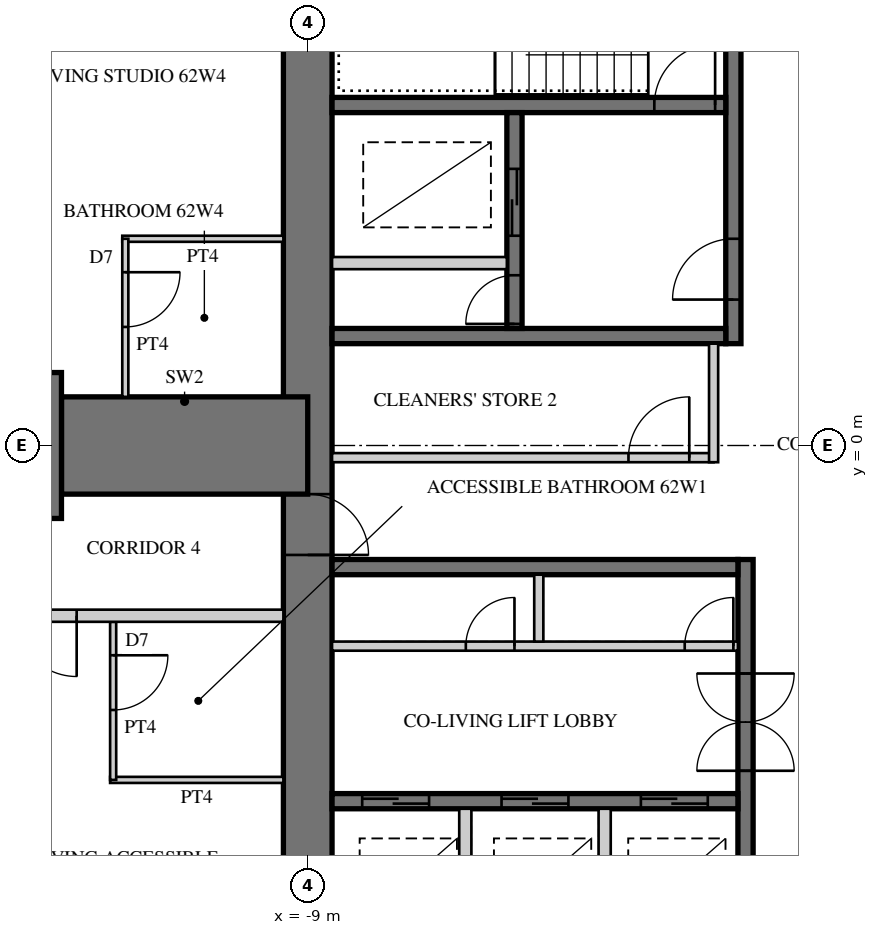
"""IFC4 building model, lengths in metres.
Left out: names, types, materials, properties, quantities, classifications, styles, units other than length and angle.
Written with IfcOpenShell. Run it as: python <this file> out.ifc"""

import sys

from ifc_helpers import new_model, si_unit, direction, frame, frame_2d, origin, place, context, subcontext, project, spatial, rectangle, extrude, element, fill, save


model = new_model("IFC4")
c1 = context("Model", 3, precision=1e-05, world=origin(), true_north=direction((0.0, 1.0)))
c2 = subcontext(c1, "Body", "Model", "MODEL_VIEW")
j1 = project(units=[si_unit("LENGTHUNIT", "METRE"), si_unit("PLANEANGLEUNIT", "RADIAN")], contexts=[c1])
p1 = place(None, origin())
s1 = spatial("IfcSite", under=j1, at=p1, CompositionType="ELEMENT")
p2 = place(p1, origin())
s2 = spatial("IfcBuilding", under=s1, at=p2, CompositionType="ELEMENT")
p3 = place(p2, frame((0.0, 0.0, 242.5)))
s3 = spatial("IfcBuildingStorey", under=s2, at=p3, CompositionType="ELEMENT", Elevation=242.5)
p4 = place(p3, frame((-9.0, 9.0, 0.0), z_axis=(0.0, 0.0, 1.0), x_axis=(0.0, -1.0, 0.0)))
e1 = element("IfcWall", 1, at=p4, inside=s3, PredefinedType="SHEAR", context=c2, shape_type="SweptSolid", body=[
    extrude(rectangle(XDim=18.0, YDim=0.8, at=frame_2d((9.0, 0.0))), origin(), (0.0, 0.0, 1.0), 3.4),
])
p5 = place(p4, frame((9.8, 0.0, 0.0)))
e2 = element("IfcOpeningElement", 2, at=p5, cuts=e1, PredefinedType="OPENING", context=c2, shape_type="SweptSolid", body=[
    extrude(rectangle(XDim=1.0, YDim=2.4, at=frame_2d((0.5, 1.2))), frame((0.0, 0.41, 0.0), z_axis=(0.0, -1.0, 0.0), x_axis=(1.0, 0.0, 0.0)), (0.0, 0.0, 1.0), 0.82),
])
p6 = place(p3, frame((-2.0, 1.675, 0.0), z_axis=(0.0, 0.0, 1.0), x_axis=(0.0, 1.0, 0.0)))
e3 = element("IfcWall", 3, at=p6, inside=s3, PredefinedType="SHEAR", context=c2, shape_type="SweptSolid", body=[
    extrude(rectangle(XDim=6.925, YDim=0.25, at=frame_2d((3.462, 0.0))), origin(), (0.0, 0.0, 1.0), 3.4),
])
p7 = place(p6, frame((0.725, 0.0, 0.0)))
e4 = element("IfcOpeningElement", 4, at=p7, cuts=e3, PredefinedType="OPENING", context=c2, shape_type="SweptSolid", body=[
    extrude(rectangle(XDim=1.0, YDim=2.1, at=frame_2d((0.5, 1.05))), frame((0.0, 0.135, 0.0), z_axis=(0.0, -1.0, 0.0), x_axis=(1.0, 0.0, 0.0)), (0.0, 0.0, 1.0), 0.27),
])
p8 = place(p3, frame((-2.125, 1.8, 0.0), z_axis=(0.0, 0.0, 1.0), x_axis=(-1.0, 0.0, 0.0)))
e5 = element("IfcWall", 5, at=p8, inside=s3, PredefinedType="SHEAR", context=c2, shape_type="SweptSolid", body=[
    extrude(rectangle(XDim=6.475, YDim=0.25, at=frame_2d((3.238, 0.0))), origin(), (0.0, 0.0, 1.0), 3.4),
])
p9 = place(p3, frame((-2.125, 5.6, 0.0), z_axis=(0.0, 0.0, 1.0), x_axis=(-1.0, 0.0, 0.0)))
e6 = element("IfcWall", 6, at=p9, inside=s3, PredefinedType="SHEAR", context=c2, shape_type="SweptSolid", body=[
    extrude(rectangle(XDim=6.475, YDim=0.25, at=frame_2d((3.238, 0.0))), origin(), (0.0, 0.0, 1.0), 3.4),
])
p10 = place(p9, frame((0.175, 0.0, 0.0)))
e7 = element("IfcOpeningElement", 7, at=p10, cuts=e6, PredefinedType="OPENING", context=c2, shape_type="SweptSolid", body=[
    extrude(rectangle(XDim=1.0, YDim=2.1, at=frame_2d((0.5, 1.05))), frame((0.0, 0.135, 0.0), z_axis=(0.0, -1.0, 0.0), x_axis=(1.0, 0.0, 0.0)), (0.0, 0.0, 1.0), 0.27),
])
p11 = place(p3, frame((-5.6, 1.925, 0.0), z_axis=(0.0, 0.0, 1.0), x_axis=(0.0, 1.0, 0.0)))
e8 = element("IfcWall", 8, at=p11, inside=s3, PredefinedType="SHEAR", context=c2, shape_type="SweptSolid", body=[
    extrude(rectangle(XDim=3.55, YDim=0.25, at=frame_2d((1.775, 0.0))), origin(), (0.0, 0.0, 1.0), 3.4),
])
p12 = place(p11, frame((1.525, 0.0, 0.0)))
e9 = element("IfcOpeningElement", 9, at=p12, cuts=e8, PredefinedType="OPENING", context=c2, shape_type="SweptSolid", body=[
    extrude(rectangle(XDim=1.1, YDim=2.2, at=frame_2d((0.55, 1.1))), frame((0.0, 0.135, 0.0), z_axis=(0.0, -1.0, 0.0), x_axis=(1.0, 0.0, 0.0)), (0.0, 0.0, 1.0), 0.27),
])
p13 = place(p11, frame((0.075, 0.0, 0.0)))
e10 = element("IfcOpeningElement", 10, at=p13, cuts=e8, PredefinedType="OPENING", context=c2, shape_type="SweptSolid", body=[
    extrude(rectangle(XDim=0.8, YDim=2.1, at=frame_2d((0.4, 1.05))), frame((0.0, 0.135, 0.0), z_axis=(0.0, -1.0, 0.0), x_axis=(1.0, 0.0, 0.0)), (0.0, 0.0, 1.0), 0.27),
])
p14 = place(p3, frame((-5.725, 3.0, 0.0), z_axis=(0.0, 0.0, 1.0), x_axis=(-1.0, 0.0, 0.0)))
e11 = element("IfcWall", 11, at=p14, inside=s3, PredefinedType="PARTITIONING", context=c2, shape_type="SweptSolid", body=[
    extrude(rectangle(XDim=2.875, YDim=0.2, at=frame_2d((1.438, 0.0))), origin(), (0.0, 0.0, 1.0), 3.4),
])
p15 = place(p3, frame((-1.8, -1.875, 0.0), z_axis=(0.0, 0.0, 1.0), x_axis=(0.0, -1.0, 0.0)))
e12 = element("IfcWall", 12, at=p15, inside=s3, PredefinedType="SHEAR", context=c2, shape_type="SweptSolid", body=[
    extrude(rectangle(XDim=6.725, YDim=0.25, at=frame_2d((3.363, 0.0))), origin(), (0.0, 0.0, 1.0), 3.4),
])
p16 = place(p15, frame((1.875, 0.0, 0.0)))
e13 = element("IfcOpeningElement", 13, at=p16, cuts=e12, PredefinedType="OPENING", context=c2, shape_type="SweptSolid", body=[
    extrude(rectangle(XDim=1.6, YDim=2.4, at=frame_2d((0.8, 1.2))), frame((0.0, 0.135, 0.0), z_axis=(0.0, -1.0, 0.0), x_axis=(1.0, 0.0, 0.0)), (0.0, 0.0, 1.0), 0.27),
])
p17 = place(p3, frame((-1.925, -2.0, 0.0), z_axis=(0.0, 0.0, 1.0), x_axis=(-1.0, 0.0, 0.0)))
e14 = element("IfcWall", 14, at=p17, inside=s3, PredefinedType="SHEAR", context=c2, shape_type="SweptSolid", body=[
    extrude(rectangle(XDim=6.675, YDim=0.25, at=frame_2d((3.337, 0.0))), origin(), (0.0, 0.0, 1.0), 3.4),
])
p18 = place(p3, frame((-1.925, -5.85, 0.0), z_axis=(0.0, 0.0, 1.0), x_axis=(-1.0, 0.0, 0.0)))
e15 = element("IfcWall", 15, at=p18, inside=s3, PredefinedType="SHEAR", context=c2, shape_type="SweptSolid", body=[
    extrude(rectangle(XDim=6.675, YDim=0.25, at=frame_2d((3.337, 0.0))), origin(), (0.0, 0.0, 1.0), 3.4),
])
p19 = place(p18, frame((0.496, 0.0, 0.0)))
e16 = element("IfcOpeningElement", 16, at=p19, cuts=e15, PredefinedType="OPENING", context=c2, shape_type="SweptSolid", body=[
    extrude(rectangle(XDim=1.1, YDim=2.2, at=frame_2d((0.55, 1.1))), frame((0.0, 0.135, 0.0), z_axis=(0.0, -1.0, 0.0), x_axis=(1.0, 0.0, 0.0)), (0.0, 0.0, 1.0), 0.27),
])
p20 = place(p18, frame((2.788, 0.0, 0.0)))
e17 = element("IfcOpeningElement", 17, at=p20, cuts=e15, PredefinedType="OPENING", context=c2, shape_type="SweptSolid", body=[
    extrude(rectangle(XDim=1.1, YDim=2.2, at=frame_2d((0.55, 1.1))), frame((0.0, 0.135, 0.0), z_axis=(0.0, -1.0, 0.0), x_axis=(1.0, 0.0, 0.0)), (0.0, 0.0, 1.0), 0.27),
])
p21 = place(p18, frame((5.079, 0.0, 0.0)))
e18 = element("IfcOpeningElement", 18, at=p21, cuts=e15, PredefinedType="OPENING", context=c2, shape_type="SweptSolid", body=[
    extrude(rectangle(XDim=1.1, YDim=2.2, at=frame_2d((0.55, 1.1))), frame((0.0, 0.135, 0.0), z_axis=(0.0, -1.0, 0.0), x_axis=(1.0, 0.0, 0.0)), (0.0, 0.0, 1.0), 0.27),
])
p22 = place(p3, frame((-1.925, -3.3, 0.0), z_axis=(0.0, 0.0, 1.0), x_axis=(-1.0, 0.0, 0.0)))
e19 = element("IfcWall", 19, at=p22, inside=s3, PredefinedType="PARTITIONING", context=c2, shape_type="SweptSolid", body=[
    extrude(rectangle(XDim=6.675, YDim=0.15, at=frame_2d((3.337, 0.0))), origin(), (0.0, 0.0, 1.0), 3.4),
])
p23 = place(p22, frame((0.075, 0.0, 0.0)))
e20 = element("IfcOpeningElement", 20, at=p23, cuts=e19, PredefinedType="OPENING", context=c2, shape_type="SweptSolid", body=[
    extrude(rectangle(XDim=0.8, YDim=2.1, at=frame_2d((0.4, 1.05))), frame((0.0, 0.085, 0.0), z_axis=(0.0, -1.0, 0.0), x_axis=(1.0, 0.0, 0.0)), (0.0, 0.0, 1.0), 0.17),
])
p24 = place(p22, frame((3.675, 0.0, 0.0)))
e21 = element("IfcOpeningElement", 21, at=p24, cuts=e19, PredefinedType="OPENING", context=c2, shape_type="SweptSolid", body=[
    extrude(rectangle(XDim=0.8, YDim=2.1, at=frame_2d((0.4, 1.05))), frame((0.0, 0.085, 0.0), z_axis=(0.0, -1.0, 0.0), x_axis=(1.0, 0.0, 0.0)), (0.0, 0.0, 1.0), 0.17),
])
p25 = place(p3, frame((-5.2, -2.125, 0.0), z_axis=(0.0, 0.0, 1.0), x_axis=(0.0, -1.0, 0.0)))
e22 = element("IfcWall", 22, at=p25, inside=s3, PredefinedType="PARTITIONING", context=c2, shape_type="SweptSolid", body=[
    extrude(rectangle(XDim=1.1, YDim=0.15, at=frame_2d((0.55, 0.0))), origin(), (0.0, 0.0, 1.0), 3.4),
])
for number, where, z_axis, x_axis in (
    (23, (-4.117, -5.975, 0.0), (0.0, 0.0, 1.0), (0.0, -1.0, 0.0)),
    (24, (-6.408, -5.975, 0.0), (0.0, 0.0, 1.0), (0.0, -1.0, 0.0)),
):
    element("IfcWall", number, at=place(p3, frame(where, z_axis=z_axis, x_axis=x_axis)), inside=s3, PredefinedType="PARTITIONING", context=c2, shape_type="SweptSolid", body=[
        extrude(rectangle(XDim=2.625, YDim=0.2, at=frame_2d((1.312, 0.0))), origin(), (0.0, 0.0, 1.0), 3.4),
    ])
p26 = place(p3, frame((-9.0, 0.0, 0.0), z_axis=(0.0, 0.0, 1.0), x_axis=(-1.0, 0.0, 0.0)))
e25 = element("IfcWall", 25, at=p26, inside=s3, PredefinedType="SHEAR", context=c2, shape_type="SweptSolid", body=[
    extrude(rectangle(XDim=4.05, YDim=1.6, at=frame_2d((2.025, 0.0))), origin(), (0.0, 0.0, 1.0), 3.4),
])
p27 = place(p3, frame((-13.05, 0.0, 0.0), z_axis=(0.0, 0.0, 1.0), x_axis=(-1.0, 0.0, 0.0)))
e26 = element("IfcWall", 26, at=p27, inside=s3, PredefinedType="SHEAR", context=c2, shape_type="SweptSolid", body=[
    extrude(rectangle(XDim=13.95, YDim=2.4, at=frame_2d((6.975, 0.0))), origin(), (0.0, 0.0, 1.0), 3.4),
])
p28 = place(p27, frame((0.3, 0.0, 0.0)))
e27 = element("IfcOpeningElement", 27, at=p28, cuts=e26, PredefinedType="OPENING", context=c2, shape_type="SweptSolid", body=[
    extrude(rectangle(XDim=1.0, YDim=2.15, at=frame_2d((0.5, 1.075))), frame((0.0, 1.21, 0.0), z_axis=(0.0, -1.0, 0.0), x_axis=(1.0, 0.0, 0.0)), (0.0, 0.0, 1.0), 2.42),
])
p29 = place(p27, frame((2.55, 0.0, 0.0)))
e28 = element("IfcOpeningElement", 28, at=p29, cuts=e26, PredefinedType="OPENING", context=c2, shape_type="SweptSolid", body=[
    extrude(rectangle(XDim=1.0, YDim=2.15, at=frame_2d((0.5, 1.075))), frame((0.0, 1.21, 0.0), z_axis=(0.0, -1.0, 0.0), x_axis=(1.0, 0.0, 0.0)), (0.0, 0.0, 1.0), 2.42),
])
p30 = place(p27, frame((9.25, 0.0, 0.0)))
e29 = element("IfcOpeningElement", 29, at=p30, cuts=e26, PredefinedType="OPENING", context=c2, shape_type="SweptSolid", body=[
    extrude(rectangle(XDim=1.0, YDim=2.2, at=frame_2d((0.5, 1.1))), frame((0.0, 1.21, 0.0), z_axis=(0.0, -1.0, 0.0), x_axis=(1.0, 0.0, 0.0)), (0.0, 0.0, 1.0), 2.42),
])
p31 = place(p3, frame((-2.325, -0.2, 0.0), z_axis=(0.0, 0.0, 1.0), x_axis=(-1.0, 0.0, 0.0)))
e30 = element("IfcWall", 30, at=p31, inside=s3, PredefinedType="PARTITIONING", context=c2, shape_type="SweptSolid", body=[
    extrude(rectangle(XDim=6.275, YDim=0.15, at=frame_2d((3.138, 0.0))), origin(), (0.0, 0.0, 1.0), 3.22),
])
p32 = place(p31, frame((0.4, 0.0, 0.0)))
e31 = element("IfcOpeningElement", 31, at=p32, cuts=e30, PredefinedType="OPENING", context=c2, shape_type="SweptSolid", body=[
    extrude(rectangle(XDim=1.0, YDim=2.1, at=frame_2d((0.5, 1.05))), frame((0.0, 0.085, 0.0), z_axis=(0.0, -1.0, 0.0), x_axis=(1.0, 0.0, 0.0)), (0.0, 0.0, 1.0), 0.17),
])
p33 = place(p3, frame((-2.325, 1.675, 0.0), z_axis=(0.0, 0.0, 1.0), x_axis=(0.0, -1.0, 0.0)))
e32 = element("IfcWall", 32, at=p33, inside=s3, PredefinedType="PARTITIONING", context=c2, shape_type="SweptSolid", body=[
    extrude(rectangle(XDim=1.95, YDim=0.15, at=frame_2d((0.975, 0.0))), origin(), (0.0, 0.0, 1.0), 3.22),
])
p34 = place(p3, frame((-9.4, -5.5, 0.0), z_axis=(0.0, 0.0, 1.0), x_axis=(-1.0, 0.0, 0.0)))
e33 = element("IfcWall", 33, at=p34, inside=s3, PredefinedType="PARTITIONING", context=c2, shape_type="SweptSolid", body=[
    extrude(rectangle(XDim=2.85, YDim=0.1, at=frame_2d((1.425, 0.0))), origin(), (0.0, 0.0, 1.0), 3.22),
])
p35 = place(p3, frame((-12.2, -2.9, 0.0), z_axis=(0.0, 0.0, 1.0), x_axis=(0.0, -1.0, 0.0)))
e34 = element("IfcWall", 34, at=p35, inside=s3, PredefinedType="PARTITIONING", context=c2, shape_type="SweptSolid", body=[
    extrude(rectangle(XDim=2.6, YDim=0.1, at=frame_2d((1.3, 0.0))), origin(), (0.0, 0.0, 1.0), 3.22),
])
p36 = place(p35, frame((0.55, 0.0, 0.0)))
e35 = element("IfcOpeningElement", 35, at=p36, cuts=e34, PredefinedType="OPENING", context=c2, shape_type="SweptSolid", body=[
    extrude(rectangle(XDim=0.9, YDim=2.1, at=frame_2d((0.45, 1.05))), frame((0.0, 0.06, 0.0), z_axis=(0.0, -1.0, 0.0), x_axis=(1.0, 0.0, 0.0)), (0.0, 0.0, 1.0), 0.12),
])
p37 = place(p3, frame((-9.4, 3.4, 0.0), z_axis=(0.0, 0.0, 1.0), x_axis=(-1.0, 0.0, 0.0)))
e36 = element("IfcWall", 36, at=p37, inside=s3, PredefinedType="PARTITIONING", context=c2, shape_type="SweptSolid", body=[
    extrude(rectangle(XDim=2.65, YDim=0.1, at=frame_2d((1.325, 0.0))), origin(), (0.0, 0.0, 1.0), 3.22),
])
p38 = place(p3, frame((-12.0, 3.4, 0.0), z_axis=(0.0, 0.0, 1.0), x_axis=(0.0, -1.0, 0.0)))
e37 = element("IfcWall", 37, at=p38, inside=s3, PredefinedType="PARTITIONING", context=c2, shape_type="SweptSolid", body=[
    extrude(rectangle(XDim=2.6, YDim=0.1, at=frame_2d((1.3, 0.0))), origin(), (0.0, 0.0, 1.0), 3.22),
])
p39 = place(p38, frame((0.55, 0.0, 0.0)))
e38 = element("IfcOpeningElement", 38, at=p39, cuts=e37, PredefinedType="OPENING", context=c2, shape_type="SweptSolid", body=[
    extrude(rectangle(XDim=0.9, YDim=2.1, at=frame_2d((0.45, 1.05))), frame((0.0, 0.06, 0.0), z_axis=(0.0, -1.0, 0.0), x_axis=(1.0, 0.0, 0.0)), (0.0, 0.0, 1.0), 0.12),
])
p40 = place(p3, frame((-9.4, -2.8, 0.0), z_axis=(0.0, 0.0, 1.0), x_axis=(-1.0, 0.0, 0.0)))
e39 = element("IfcWall", 39, at=p40, inside=s3, PredefinedType="SOLIDWALL", context=c2, shape_type="SweptSolid", body=[
    extrude(rectangle(XDim=11.6, YDim=0.2, at=frame_2d((5.8, 0.0))), origin(), (0.0, 0.0, 1.0), 3.22),
])
p41 = place(p40, frame((3.4, 0.0, 0.0)))
e40 = element("IfcOpeningElement", 40, at=p41, cuts=e39, PredefinedType="OPENING", context=c2, shape_type="SweptSolid", body=[
    extrude(rectangle(XDim=1.0, YDim=2.15, at=frame_2d((0.5, 1.075))), frame((0.0, 0.11, 0.0), z_axis=(0.0, -1.0, 0.0), x_axis=(1.0, 0.0, 0.0)), (0.0, 0.0, 1.0), 0.22),
])
p42 = place(p40, frame((6.8, 0.0, 0.0)))
e41 = element("IfcOpeningElement", 41, at=p42, cuts=e39, PredefinedType="OPENING", context=c2, shape_type="SweptSolid", body=[
    extrude(rectangle(XDim=1.0, YDim=2.2, at=frame_2d((0.5, 1.1))), frame((0.0, 0.11, 0.0), z_axis=(0.0, -1.0, 0.0), x_axis=(1.0, 0.0, 0.0)), (0.0, 0.0, 1.0), 0.22),
])
p43 = place(p32, frame((1.0, 0.0, 0.0), z_axis=(0.0, 0.0, 1.0), x_axis=(-1.0, 0.0, 0.0)))
e42 = element("IfcDoor", 42, at=p43, inside=s3, OperationType="SINGLE_SWING_RIGHT", PredefinedType="DOOR", context=c2, shape_type="SweptSolid", body=[
    extrude(rectangle(XDim=1.0, YDim=2.1, at=frame_2d((0.5, 1.05))), frame((0.0, 0.025, 0.0), z_axis=(0.0, -1.0, 0.0), x_axis=(1.0, 0.0, 0.0)), (0.0, 0.0, 1.0), 0.05),
])
fill(e31, e42)
p44 = place(p36, origin())
e43 = element("IfcDoor", 43, at=p44, inside=s3, OperationType="SINGLE_SWING_LEFT", PredefinedType="DOOR", context=c2, shape_type="SweptSolid", body=[
    extrude(rectangle(XDim=0.9, YDim=2.1, at=frame_2d((0.45, 1.05))), frame((0.0, 0.025, 0.0), z_axis=(0.0, -1.0, 0.0), x_axis=(1.0, 0.0, 0.0)), (0.0, 0.0, 1.0), 0.05),
])
fill(e35, e43)
p45 = place(p39, origin())
e44 = element("IfcDoor", 44, at=p45, inside=s3, OperationType="SINGLE_SWING_LEFT", PredefinedType="DOOR", context=c2, shape_type="SweptSolid", body=[
    extrude(rectangle(XDim=0.9, YDim=2.1, at=frame_2d((0.45, 1.05))), frame((0.0, 0.025, 0.0), z_axis=(0.0, -1.0, 0.0), x_axis=(1.0, 0.0, 0.0)), (0.0, 0.0, 1.0), 0.05),
])
fill(e38, e44)
p46 = place(p41, origin())
e45 = element("IfcDoor", 45, at=p46, inside=s3, OperationType="SINGLE_SWING_LEFT", PredefinedType="DOOR", context=c2, shape_type="SweptSolid", body=[
    extrude(rectangle(XDim=1.0, YDim=2.15, at=frame_2d((0.5, 1.075))), frame((0.0, 0.025, 0.0), z_axis=(0.0, -1.0, 0.0), x_axis=(1.0, 0.0, 0.0)), (0.0, 0.0, 1.0), 0.05),
])
fill(e40, e45)
p47 = place(p5, origin())
e46 = element("IfcDoor", 46, at=p47, inside=s3, OperationType="SINGLE_SWING_RIGHT", PredefinedType="DOOR", context=c2, shape_type="SweptSolid", body=[
    extrude(rectangle(XDim=1.0, YDim=2.4, at=frame_2d((0.5, 1.2))), frame((0.0, 0.055, 0.0), z_axis=(0.0, -1.0, 0.0), x_axis=(1.0, 0.0, 0.0)), (0.0, 0.0, 1.0), 0.05),
])
fill(e2, e46)
p48 = place(p7, origin())
e47 = element("IfcDoor", 47, at=p48, inside=s3, OperationType="SINGLE_SWING_LEFT", PredefinedType="DOOR", context=c2, shape_type="SweptSolid", body=[
    extrude(rectangle(XDim=1.0, YDim=2.1, at=frame_2d((0.5, 1.05))), frame((0.0, 0.025, 0.0), z_axis=(0.0, -1.0, 0.0), x_axis=(1.0, 0.0, 0.0)), (0.0, 0.0, 1.0), 0.05),
])
fill(e4, e47)
p49 = place(p10, frame((1.0, 0.0, 0.0), z_axis=(0.0, 0.0, 1.0), x_axis=(-1.0, 0.0, 0.0)))
e48 = element("IfcDoor", 48, at=p49, inside=s3, OperationType="SINGLE_SWING_RIGHT", PredefinedType="DOOR", context=c2, shape_type="SweptSolid", body=[
    extrude(rectangle(XDim=1.0, YDim=2.1, at=frame_2d((0.5, 1.05))), frame((0.0, 0.025, 0.0), z_axis=(0.0, -1.0, 0.0), x_axis=(1.0, 0.0, 0.0)), (0.0, 0.0, 1.0), 0.05),
])
fill(e7, e48)
p50 = place(p12, origin())
e49 = element("IfcDoor", 49, at=p50, inside=s3, OperationType="DOUBLE_DOOR_SLIDING", PredefinedType="DOOR", context=c2, shape_type="SweptSolid", body=[
    extrude(rectangle(XDim=1.1, YDim=2.2, at=frame_2d((0.55, 1.1))), frame((0.0, 0.025, 0.0), z_axis=(0.0, -1.0, 0.0), x_axis=(1.0, 0.0, 0.0)), (0.0, 0.0, 1.0), 0.05),
])
fill(e9, e49)
p51 = place(p13, origin())
e50 = element("IfcDoor", 50, at=p51, inside=s3, OperationType="SINGLE_SWING_LEFT", PredefinedType="DOOR", context=c2, shape_type="SweptSolid", body=[
    extrude(rectangle(XDim=0.8, YDim=2.1, at=frame_2d((0.4, 1.05))), frame((0.0, 0.025, 0.0), z_axis=(0.0, -1.0, 0.0), x_axis=(1.0, 0.0, 0.0)), (0.0, 0.0, 1.0), 0.05),
])
fill(e10, e50)
p52 = place(p19, origin())
e51 = element("IfcDoor", 51, at=p52, inside=s3, OperationType="DOUBLE_DOOR_SLIDING", PredefinedType="DOOR", context=c2, shape_type="SweptSolid", body=[
    extrude(rectangle(XDim=1.1, YDim=2.2, at=frame_2d((0.55, 1.1))), frame((0.0, 0.025, 0.0), z_axis=(0.0, -1.0, 0.0), x_axis=(1.0, 0.0, 0.0)), (0.0, 0.0, 1.0), 0.05),
])
fill(e16, e51)
p53 = place(p20, origin())
e52 = element("IfcDoor", 52, at=p53, inside=s3, OperationType="DOUBLE_DOOR_SLIDING", PredefinedType="DOOR", context=c2, shape_type="SweptSolid", body=[
    extrude(rectangle(XDim=1.1, YDim=2.2, at=frame_2d((0.55, 1.1))), frame((0.0, 0.025, 0.0), z_axis=(0.0, -1.0, 0.0), x_axis=(1.0, 0.0, 0.0)), (0.0, 0.0, 1.0), 0.05),
])
fill(e17, e52)
p54 = place(p21, origin())
e53 = element("IfcDoor", 53, at=p54, inside=s3, OperationType="DOUBLE_DOOR_SLIDING", PredefinedType="DOOR", context=c2, shape_type="SweptSolid", body=[
    extrude(rectangle(XDim=1.1, YDim=2.2, at=frame_2d((0.55, 1.1))), frame((0.0, 0.025, 0.0), z_axis=(0.0, -1.0, 0.0), x_axis=(1.0, 0.0, 0.0)), (0.0, 0.0, 1.0), 0.05),
])
fill(e18, e53)
p55 = place(p16, origin())
e54 = element("IfcDoor", 54, at=p55, inside=s3, OperationType="DOUBLE_DOOR_DOUBLE_SWING", PredefinedType="DOOR", context=c2, shape_type="SweptSolid", body=[
    extrude(rectangle(XDim=1.6, YDim=2.4, at=frame_2d((0.8, 1.2))), frame((0.0, 0.025, 0.0), z_axis=(0.0, -1.0, 0.0), x_axis=(1.0, 0.0, 0.0)), (0.0, 0.0, 1.0), 0.05),
])
fill(e13, e54)
p56 = place(p23, frame((0.8, 0.0, 0.0), z_axis=(0.0, 0.0, 1.0), x_axis=(-1.0, 0.0, 0.0)))
e55 = element("IfcDoor", 55, at=p56, inside=s3, OperationType="SINGLE_SWING_RIGHT", PredefinedType="DOOR", context=c2, shape_type="SweptSolid", body=[
    extrude(rectangle(XDim=0.8, YDim=2.1, at=frame_2d((0.4, 1.05))), frame((0.0, 0.025, 0.0), z_axis=(0.0, -1.0, 0.0), x_axis=(1.0, 0.0, 0.0)), (0.0, 0.0, 1.0), 0.05),
])
fill(e20, e55)
p57 = place(p24, frame((0.8, 0.0, 0.0), z_axis=(0.0, 0.0, 1.0), x_axis=(-1.0, 0.0, 0.0)))
e56 = element("IfcDoor", 56, at=p57, inside=s3, OperationType="SINGLE_SWING_RIGHT", PredefinedType="DOOR", context=c2, shape_type="SweptSolid", body=[
    extrude(rectangle(XDim=0.8, YDim=2.1, at=frame_2d((0.4, 1.05))), frame((0.0, 0.025, 0.0), z_axis=(0.0, -1.0, 0.0), x_axis=(1.0, 0.0, 0.0)), (0.0, 0.0, 1.0), 0.05),
])
fill(e21, e56)
save(model, sys.argv[1])
